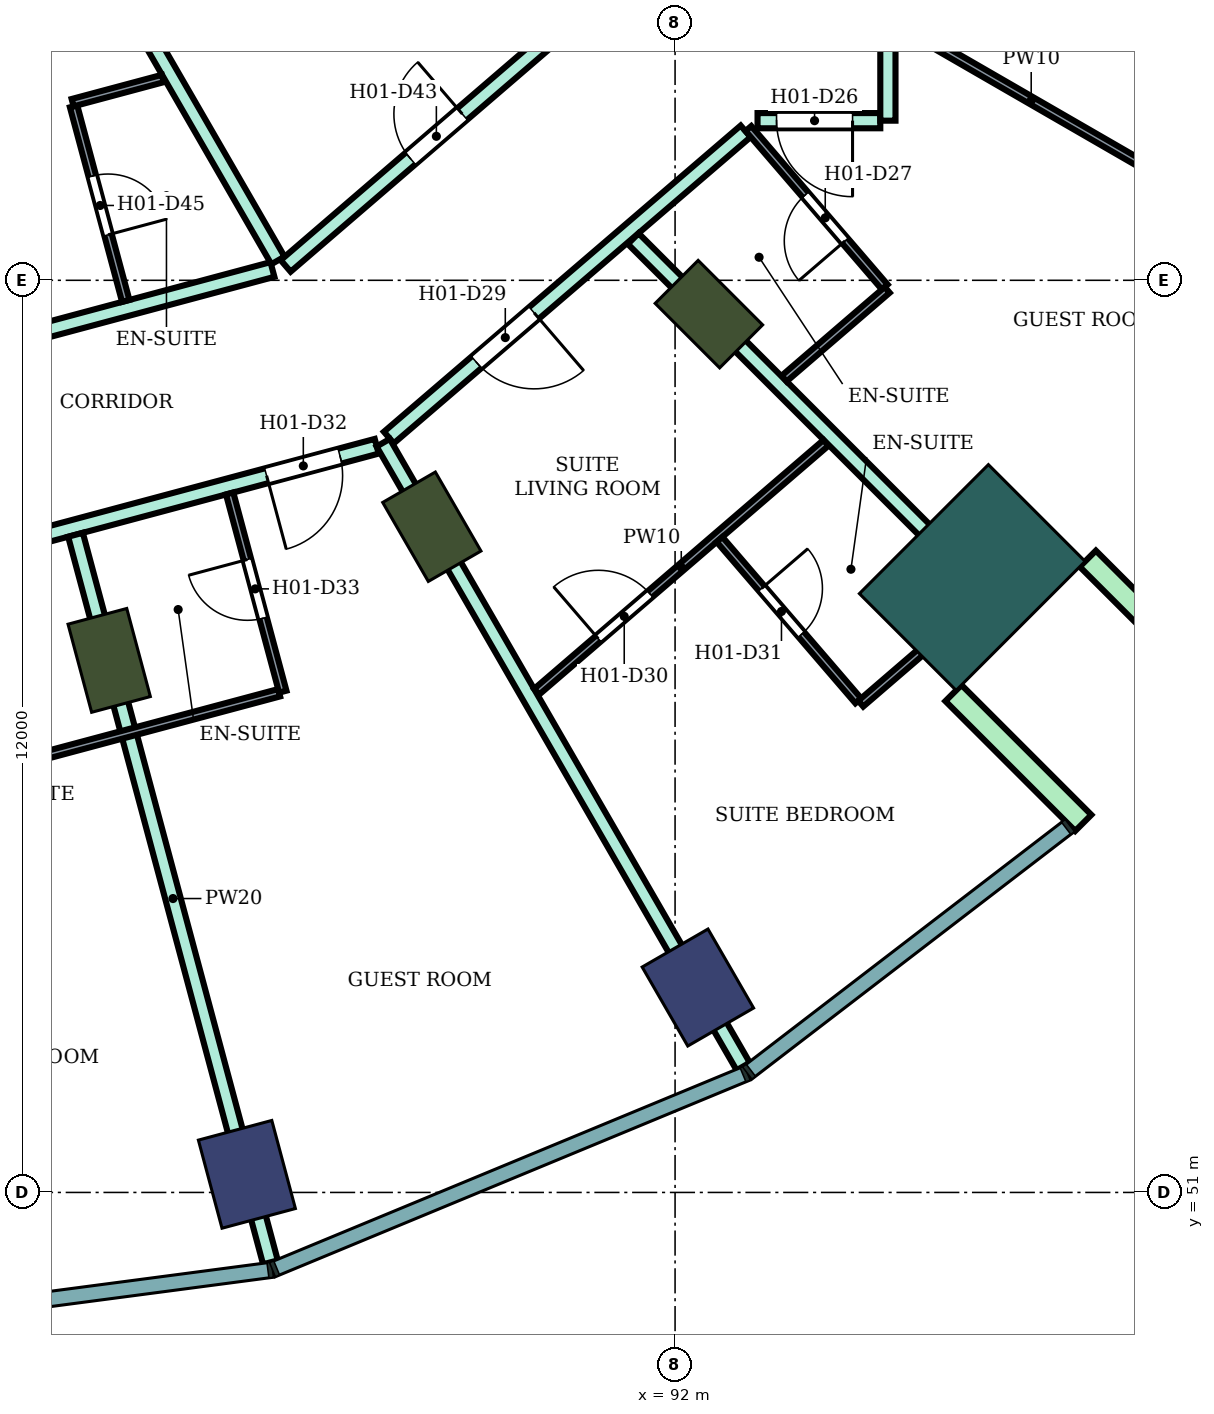
"""IFC4 building model, lengths in metres.
Left out: names, types, materials, properties, quantities, classifications, styles, units other than length and angle.
Written with IfcOpenShell. Run it as: python <this file> out.ifc"""

import sys

from ifc_helpers import new_model, si_unit, direction, frame, frame_2d, origin, origin_2d, place, context, subcontext, project, spatial, rectangle, extrude, element, fill, save


model = new_model("IFC4")
c1 = context("Model", 3, precision=1e-05, world=origin(), true_north=direction((0.0, 1.0)))
c2 = subcontext(c1, "Body", "Model", "MODEL_VIEW")
j1 = project(units=[si_unit("LENGTHUNIT", "METRE"), si_unit("PLANEANGLEUNIT", "RADIAN")], contexts=[c1])
p1 = place(None, origin())
s1 = spatial("IfcSite", under=j1, at=p1, CompositionType="ELEMENT")
p2 = place(p1, origin())
s2 = spatial("IfcBuilding", under=s1, at=p2, CompositionType="ELEMENT")
p3 = place(p2, frame((0.0, 0.0, 32.6)))
s3 = spatial("IfcBuildingStorey", under=s2, at=p3, CompositionType="ELEMENT", Elevation=32.6)
for number, where, z_axis, x_axis in (
    (1, (86.367, 51.238, 0.0), (0.0, 0.0, 1.0), (0.259, -0.966, 0.0)),
    (2, (92.3, 53.696, 0.0), (0.0, 0.0, 1.0), (0.5, -0.866, 0.0)),
):
    element("IfcColumn", number, at=place(p3, frame(where, z_axis=z_axis, x_axis=x_axis)), inside=s3, PredefinedType="COLUMN", context=c2, shape_type="SweptSolid", body=[
        extrude(rectangle(XDim=1.2, YDim=1.0, at=origin_2d()), origin(), (0.0, 0.0, 1.0), 3.8),
    ])
for number, where, z_axis, x_axis in (
    (3, (84.555, 58.0, 0.0), (0.0, 0.0, 1.0), (0.259, -0.966, 0.0)),
    (4, (88.8, 59.758, 0.0), (0.0, 0.0, 1.0), (0.5, -0.866, 0.0)),
    (5, (92.445, 62.555, 0.0), (0.0, 0.0, 1.0), (0.707, -0.707, 0.0)),
):
    element("IfcColumn", number, at=place(p3, frame(where, z_axis=z_axis, x_axis=x_axis)), inside=s3, PredefinedType="COLUMN", context=c2, shape_type="SweptSolid", body=[
        extrude(rectangle(XDim=1.2, YDim=0.8, at=origin_2d()), origin(), (0.0, 0.0, 1.0), 3.8),
    ])
p4 = place(p3, frame((95.91, 59.09, 0.0), z_axis=(0.0, 0.0, 1.0), x_axis=(0.707106781187, -0.707106781187, 0.0)))
e6 = element("IfcColumn", 6, at=p4, inside=s3, PredefinedType="COLUMN", context=c2, shape_type="SweptSolid", body=[
    extrude(rectangle(XDim=1.8, YDim=2.4, at=origin_2d()), origin(), (0.0, 0.0, 1.0), 3.8),
])
for number, where, z_axis, x_axis in (
    (7, (95.662, 57.57, 0.0), (0.0, 0.0, 1.0), (0.707, -0.707, 0.0)),
    (8, (97.43, 59.338, 0.0), (0.0, 0.0, 1.0), (0.707, -0.707, 0.0)),
):
    element("IfcWall", number, at=place(p3, frame(where, z_axis=z_axis, x_axis=x_axis)), inside=s3, PredefinedType="NOTDEFINED", context=c2, shape_type="SweptSolid", body=[
        extrude(rectangle(XDim=2.416, YDim=0.3, at=frame_2d((1.208, 0.0))), origin(), (0.0, 0.0, 1.0), 3.8),
    ])
p5 = place(p3, frame((80.0, 58.655, 0.0), z_axis=(0.0, 0.0, 1.0), x_axis=(0.965974635626, 0.258636817424, 0.0)))
e9 = element("IfcWall", 9, at=p5, inside=s3, PredefinedType="PARTITIONING", context=c2, shape_type="SweptSolid", body=[
    extrude(rectangle(XDim=8.36, YDim=0.2, at=frame_2d((4.18, 0.0))), origin(), (0.0, 0.0, 1.0), 3.35),
])
p6 = place(p5, frame((6.86, 0.0, 0.0)))
e10 = element("IfcOpeningElement", 10, at=p6, cuts=e9, PredefinedType="OPENING", context=c2, shape_type="SweptSolid", body=[
    extrude(rectangle(XDim=1.0, YDim=2.1, at=frame_2d((0.5, 1.05))), frame((0.0, 0.11, 0.0), z_axis=(0.0, -1.0, 0.0), x_axis=(1.0, 0.0, 0.0)), (0.0, 0.0, 1.0), 0.22),
])
p7 = place(p5, frame((0.55, 0.0, 0.0)))
e11 = element("IfcOpeningElement", 11, at=p7, cuts=e9, PredefinedType="OPENING", context=c2, shape_type="SweptSolid", body=[
    extrude(rectangle(XDim=1.0, YDim=2.1, at=frame_2d((0.5, 1.05))), frame((0.0, 0.11, 0.0), z_axis=(0.0, -1.0, 0.0), x_axis=(1.0, 0.0, 0.0)), (0.0, 0.0, 1.0), 0.22),
])
p8 = place(p3, frame((80.0, 61.346, 0.0), z_axis=(0.0, 0.0, 1.0), x_axis=(0.965924181808, 0.258825182312, 0.0)))
e12 = element("IfcWall", 12, at=p8, inside=s3, PredefinedType="PARTITIONING", context=c2, shape_type="SweptSolid", body=[
    extrude(rectangle(XDim=6.94, YDim=0.2, at=frame_2d((3.47, 0.0))), origin(), (0.0, 0.0, 1.0), 3.35),
])
p9 = place(p8, frame((0.55, 0.0, 0.0)))
e13 = element("IfcOpeningElement", 13, at=p9, cuts=e12, PredefinedType="OPENING", context=c2, shape_type="SweptSolid", body=[
    extrude(rectangle(XDim=1.0, YDim=2.1, at=frame_2d((0.5, 1.05))), frame((0.0, 0.11, 0.0), z_axis=(0.0, -1.0, 0.0), x_axis=(1.0, 0.0, 0.0)), (0.0, 0.0, 1.0), 0.22),
])
p10 = place(p3, frame((83.848, 68.333, 0.0), z_axis=(0.0, 0.0, 1.0), x_axis=(0.499951054106, -0.866053660865, 0.0)))
e14 = element("IfcWall", 14, at=p10, inside=s3, PredefinedType="PARTITIONING", context=c2, shape_type="SweptSolid", body=[
    extrude(rectangle(XDim=5.855, YDim=0.2, at=frame_2d((2.927, 0.0))), origin(), (0.0, 0.0, 1.0), 3.35),
])
p11 = place(p3, frame((84.112, 59.652, 0.0), z_axis=(0.0, 0.0, 1.0), x_axis=(0.258791091927, -0.965933315886, 0.0)))
e15 = element("IfcWall", 15, at=p11, inside=s3, PredefinedType="PARTITIONING", context=c2, shape_type="SweptSolid", body=[
    extrude(rectangle(XDim=9.909, YDim=0.2, at=frame_2d((4.955, 0.0))), origin(), (0.0, 0.0, 1.0), 3.35),
])
p12 = place(p3, frame((86.877, 63.189, 0.0), z_axis=(0.0, 0.0, 1.0), x_axis=(0.758075808328, 0.652166442581, 0.0)))
e16 = element("IfcWall", 16, at=p12, inside=s3, PredefinedType="PARTITIONING", context=c2, shape_type="SweptSolid", body=[
    extrude(rectangle(XDim=5.23, YDim=0.2, at=frame_2d((2.615, 0.0))), origin(), (0.0, 0.0, 1.0), 3.35),
])
p13 = place(p12, frame((2.165, 0.0, 0.0)))
e17 = element("IfcOpeningElement", 17, at=p13, cuts=e16, PredefinedType="OPENING", context=c2, shape_type="SweptSolid", body=[
    extrude(rectangle(XDim=0.9, YDim=2.1, at=frame_2d((0.45, 1.05))), frame((0.0, 0.11, 0.0), z_axis=(0.0, -1.0, 0.0), x_axis=(1.0, 0.0, 0.0)), (0.0, 0.0, 1.0), 0.22),
])
p14 = place(p3, frame((88.235, 60.931, 0.0), z_axis=(0.0, 0.0, 1.0), x_axis=(0.758799498714, 0.651324282329, 0.0)))
e18 = element("IfcWall", 18, at=p14, inside=s3, PredefinedType="PARTITIONING", context=c2, shape_type="SweptSolid", body=[
    extrude(rectangle(XDim=6.186, YDim=0.2, at=frame_2d((3.093, 0.0))), origin(), (0.0, 0.0, 1.0), 3.35),
])
p15 = place(p14, frame((1.519, 0.0, 0.0)))
e19 = element("IfcOpeningElement", 19, at=p15, cuts=e18, PredefinedType="OPENING", context=c2, shape_type="SweptSolid", body=[
    extrude(rectangle(XDim=1.0, YDim=2.1, at=frame_2d((0.5, 1.05))), frame((0.0, 0.11, 0.0), z_axis=(0.0, -1.0, 0.0), x_axis=(1.0, 0.0, 0.0)), (0.0, 0.0, 1.0), 0.22),
])
p16 = place(p3, frame((88.16, 60.863, 0.0), z_axis=(0.0, 0.0, 1.0), x_axis=(0.499946996988, -0.866056002925, 0.0)))
e20 = element("IfcWall", 20, at=p16, inside=s3, PredefinedType="PARTITIONING", context=c2, shape_type="SweptSolid", body=[
    extrude(rectangle(XDim=9.475, YDim=0.2, at=frame_2d((4.737, 0.0))), origin(), (0.0, 0.0, 1.0), 3.35),
])
p17 = place(p3, frame((91.449, 63.548, 0.0), z_axis=(0.0, 0.0, 1.0), x_axis=(0.706984804638, -0.707228736698, 0.0)))
e21 = element("IfcWall", 21, at=p17, inside=s3, PredefinedType="PARTITIONING", context=c2, shape_type="SweptSolid", body=[
    extrude(rectangle(XDim=7.006, YDim=0.2, at=frame_2d((3.503, 0.0))), origin(), (0.0, 0.0, 1.0), 3.35),
])
p18 = place(p3, frame((93.085, 65.1, 0.0), z_axis=(0.0, 0.0, 1.0), x_axis=(1.0, 0.0, 0.0)))
e22 = element("IfcWall", 22, at=p18, inside=s3, PredefinedType="PARTITIONING", context=c2, shape_type="SweptSolid", body=[
    extrude(rectangle(XDim=1.615, YDim=0.2, at=frame_2d((0.808, 0.0))), origin(), (0.0, 0.0, 1.0), 3.35),
])
p19 = place(p18, frame((0.25, 0.0, 0.0)))
e23 = element("IfcOpeningElement", 23, at=p19, cuts=e22, PredefinedType="OPENING", context=c2, shape_type="SweptSolid", body=[
    extrude(rectangle(XDim=1.0, YDim=2.1, at=frame_2d((0.5, 1.05))), frame((0.0, 0.11, 0.0), z_axis=(0.0, -1.0, 0.0), x_axis=(1.0, 0.0, 0.0)), (0.0, 0.0, 1.0), 0.22),
])
p20 = place(p3, frame((94.8, 65.1, 0.0), z_axis=(0.0, 0.0, 1.0), x_axis=(0.0, 1.0, 0.0)))
e24 = element("IfcWall", 24, at=p20, inside=s3, PredefinedType="PARTITIONING", context=c2, shape_type="SweptSolid", body=[
    extrude(rectangle(XDim=1.25, YDim=0.2, at=frame_2d((0.625, 0.0))), origin(), (0.0, 0.0, 1.0), 3.35),
])
p21 = place(p3, frame((82.782, 56.501, 0.0), z_axis=(0.0, 0.0, 1.0), x_axis=(0.965999228418, 0.258544949083, 0.0)))
e25 = element("IfcWall", 25, at=p21, inside=s3, PredefinedType="PARTITIONING", context=c2, shape_type="SweptSolid", body=[
    extrude(rectangle(XDim=4.15, YDim=0.1, at=frame_2d((2.075, 0.0))), origin(), (0.0, 0.0, 1.0), 3.35),
])
p22 = place(p3, frame((84.087, 65.289, 0.0), z_axis=(0.0, 0.0, 1.0), x_axis=(0.258929459649, -0.965896234037, 0.0)))
e26 = element("IfcWall", 26, at=p22, inside=s3, PredefinedType="PARTITIONING", context=c2, shape_type="SweptSolid", body=[
    extrude(rectangle(XDim=2.65, YDim=0.1, at=frame_2d((1.325, 0.0))), origin(), (0.0, 0.0, 1.0), 3.35),
])
p23 = place(p22, frame((0.95, 0.0, 0.0)))
e27 = element("IfcOpeningElement", 27, at=p23, cuts=e26, PredefinedType="OPENING", context=c2, shape_type="SweptSolid", body=[
    extrude(rectangle(XDim=0.8, YDim=2.1, at=frame_2d((0.4, 1.05))), frame((0.0, 0.06, 0.0), z_axis=(0.0, -1.0, 0.0), x_axis=(1.0, 0.0, 0.0)), (0.0, 0.0, 1.0), 0.12),
])
p24 = place(p3, frame((84.074, 65.337, 0.0), z_axis=(0.0, 0.0, 1.0), x_axis=(0.965914351064, 0.258861867428, 0.0)))
e28 = element("IfcWall", 28, at=p24, inside=s3, PredefinedType="PARTITIONING", context=c2, shape_type="SweptSolid", body=[
    extrude(rectangle(XDim=1.229, YDim=0.1, at=frame_2d((0.615, 0.0))), origin(), (0.0, 0.0, 1.0), 3.35),
])
p25 = place(p3, frame((86.14, 60.196, 0.0), z_axis=(0.0, 0.0, 1.0), x_axis=(0.258945475746, -0.965891940432, 0.0)))
e29 = element("IfcWall", 29, at=p25, inside=s3, PredefinedType="PARTITIONING", context=c2, shape_type="SweptSolid", body=[
    extrude(rectangle(XDim=2.7, YDim=0.1, at=frame_2d((1.35, 0.0))), origin(), (0.0, 0.0, 1.0), 3.35),
])
p26 = place(p25, frame((0.9, 0.0, 0.0)))
e30 = element("IfcOpeningElement", 30, at=p26, cuts=e29, PredefinedType="OPENING", context=c2, shape_type="SweptSolid", body=[
    extrude(rectangle(XDim=0.8, YDim=2.1, at=frame_2d((0.4, 1.05))), frame((0.0, 0.06, 0.0), z_axis=(0.0, -1.0, 0.0), x_axis=(1.0, 0.0, 0.0)), (0.0, 0.0, 1.0), 0.12),
])
p27 = place(p3, frame((90.178, 57.587, 0.0), z_axis=(0.0, 0.0, 1.0), x_axis=(0.758140003227, 0.652091815243, 0.0)))
e31 = element("IfcWall", 31, at=p27, inside=s3, PredefinedType="PARTITIONING", context=c2, shape_type="SweptSolid", body=[
    extrude(rectangle(XDim=5.021, YDim=0.1, at=frame_2d((2.51, 0.0))), origin(), (0.0, 0.0, 1.0), 3.35),
])
p28 = place(p27, frame((1.071, 0.0, 0.0)))
e32 = element("IfcOpeningElement", 32, at=p28, cuts=e31, PredefinedType="OPENING", context=c2, shape_type="SweptSolid", body=[
    extrude(rectangle(XDim=0.9, YDim=2.1, at=frame_2d((0.45, 1.05))), frame((0.0, 0.06, 0.0), z_axis=(0.0, -1.0, 0.0), x_axis=(1.0, 0.0, 0.0)), (0.0, 0.0, 1.0), 0.12),
])
p29 = place(p3, frame((92.585, 59.591, 0.0), z_axis=(0.0, 0.0, 1.0), x_axis=(0.652011200591, -0.758209334092, 0.0)))
e33 = element("IfcWall", 33, at=p29, inside=s3, PredefinedType="PARTITIONING", context=c2, shape_type="SweptSolid", body=[
    extrude(rectangle(XDim=2.8, YDim=0.1, at=frame_2d((1.4, 0.0))), origin(), (0.0, 0.0, 1.0), 3.35),
])
p30 = place(p29, frame((0.85, 0.0, 0.0)))
e34 = element("IfcOpeningElement", 34, at=p30, cuts=e33, PredefinedType="OPENING", context=c2, shape_type="SweptSolid", body=[
    extrude(rectangle(XDim=0.8, YDim=2.1, at=frame_2d((0.4, 1.05))), frame((0.0, 0.06, 0.0), z_axis=(0.0, -1.0, 0.0), x_axis=(1.0, 0.0, 0.0)), (0.0, 0.0, 1.0), 0.12),
])
p31 = place(p3, frame((92.965, 64.997, 0.0), z_axis=(0.0, 0.0, 1.0), x_axis=(0.652069888227, -0.758158862553, 0.0)))
e35 = element("IfcWall", 35, at=p31, inside=s3, PredefinedType="PARTITIONING", context=c2, shape_type="SweptSolid", body=[
    extrude(rectangle(XDim=2.75, YDim=0.1, at=frame_2d((1.375, 0.0))), origin(), (0.0, 0.0, 1.0), 3.35),
])
p32 = place(p31, frame((1.15, 0.0, 0.0)))
e36 = element("IfcOpeningElement", 36, at=p32, cuts=e35, PredefinedType="OPENING", context=c2, shape_type="SweptSolid", body=[
    extrude(rectangle(XDim=0.8, YDim=2.1, at=frame_2d((0.4, 1.05))), frame((0.0, 0.06, 0.0), z_axis=(0.0, -1.0, 0.0), x_axis=(1.0, 0.0, 0.0)), (0.0, 0.0, 1.0), 0.12),
])
p33 = place(p3, frame((93.435, 61.707, 0.0), z_axis=(0.0, 0.0, 1.0), x_axis=(0.758070495124, 0.652172618578, 0.0)))
e37 = element("IfcWall", 37, at=p33, inside=s3, PredefinedType="PARTITIONING", context=c2, shape_type="SweptSolid", body=[
    extrude(rectangle(XDim=1.789, YDim=0.1, at=frame_2d((0.895, 0.0))), origin(), (0.0, 0.0, 1.0), 3.35),
])
p34 = place(p3, frame((94.443, 57.43, 0.0), z_axis=(0.0, 0.0, 1.0), x_axis=(0.757840386328, 0.65243999636, 0.0)))
e38 = element("IfcWall", 38, at=p34, inside=s3, PredefinedType="PARTITIONING", context=c2, shape_type="SweptSolid", body=[
    extrude(rectangle(XDim=2.108, YDim=0.1, at=frame_2d((1.054, 0.0))), origin(), (0.0, 0.0, 1.0), 3.35),
])
p35 = place(p3, frame((94.8, 66.455, 0.0), z_axis=(0.0, 0.0, 1.0), x_axis=(0.86602264145, -0.500004784474, 0.0)))
e39 = element("IfcWall", 39, at=p35, inside=s3, PredefinedType="PARTITIONING", context=c2, shape_type="SweptSolid", body=[
    extrude(rectangle(XDim=8.708, YDim=0.1, at=frame_2d((4.354, 0.0))), origin(), (0.0, 0.0, 1.0), 3.35),
])
p36 = place(p35, frame((3.879, 0.0, 0.0)))
e40 = element("IfcOpeningElement", 40, at=p36, cuts=e39, PredefinedType="OPENING", context=c2, shape_type="SweptSolid", body=[
    extrude(rectangle(XDim=0.9, YDim=2.1, at=frame_2d((0.45, 1.05))), frame((0.0, 0.06, 0.0), z_axis=(0.0, -1.0, 0.0), x_axis=(1.0, 0.0, 0.0)), (0.0, 0.0, 1.0), 0.12),
])
p37 = place(p19, frame((1.0, 0.0, 0.0), z_axis=(0.0, 0.0, 1.0), x_axis=(-1.0, 0.0, 0.0)))
e41 = element("IfcDoor", 41, at=p37, inside=s3, OperationType="SINGLE_SWING_LEFT", PredefinedType="DOOR", context=c2, shape_type="SweptSolid", body=[
    extrude(rectangle(XDim=1.0, YDim=2.1, at=frame_2d((0.5, 1.05))), frame((0.0, 0.025, 0.0), z_axis=(0.0, -1.0, 0.0), x_axis=(1.0, 0.0, 0.0)), (0.0, 0.0, 1.0), 0.05),
])
fill(e23, e41)
p38 = place(p32, frame((0.8, 0.0, 0.0), z_axis=(0.0, 0.0, 1.0), x_axis=(-1.0, 0.0, 0.0)))
e42 = element("IfcDoor", 42, at=p38, inside=s3, OperationType="SINGLE_SWING_LEFT", PredefinedType="DOOR", context=c2, shape_type="SweptSolid", body=[
    extrude(rectangle(XDim=0.8, YDim=2.1, at=frame_2d((0.4, 1.05))), frame((0.0, 0.025, 0.0), z_axis=(0.0, -1.0, 0.0), x_axis=(1.0, 0.0, 0.0)), (0.0, 0.0, 1.0), 0.05),
])
fill(e36, e42)
p39 = place(p15, frame((1.0, 0.0, 0.0), z_axis=(0.0, 0.0, 1.0), x_axis=(-1.0, 0.0, 0.0)))
e43 = element("IfcDoor", 43, at=p39, inside=s3, OperationType="SINGLE_SWING_LEFT", PredefinedType="DOOR", context=c2, shape_type="SweptSolid", body=[
    extrude(rectangle(XDim=1.0, YDim=2.1, at=frame_2d((0.5, 1.05))), frame((0.0, 0.025, 0.0), z_axis=(0.0, -1.0, 0.0), x_axis=(1.0, 0.0, 0.0)), (0.0, 0.0, 1.0), 0.05),
])
fill(e19, e43)
p40 = place(p28, origin())
e44 = element("IfcDoor", 44, at=p40, inside=s3, OperationType="SINGLE_SWING_LEFT", PredefinedType="DOOR", context=c2, shape_type="SweptSolid", body=[
    extrude(rectangle(XDim=0.9, YDim=2.1, at=frame_2d((0.45, 1.05))), frame((0.0, 0.025, 0.0), z_axis=(0.0, -1.0, 0.0), x_axis=(1.0, 0.0, 0.0)), (0.0, 0.0, 1.0), 0.05),
])
fill(e32, e44)
p41 = place(p30, origin())
e45 = element("IfcDoor", 45, at=p41, inside=s3, OperationType="SINGLE_SWING_LEFT", PredefinedType="DOOR", context=c2, shape_type="SweptSolid", body=[
    extrude(rectangle(XDim=0.8, YDim=2.1, at=frame_2d((0.4, 1.05))), frame((0.0, 0.025, 0.0), z_axis=(0.0, -1.0, 0.0), x_axis=(1.0, 0.0, 0.0)), (0.0, 0.0, 1.0), 0.05),
])
fill(e34, e45)
p42 = place(p6, frame((1.0, 0.0, 0.0), z_axis=(0.0, 0.0, 1.0), x_axis=(-1.0, 0.0, 0.0)))
e46 = element("IfcDoor", 46, at=p42, inside=s3, OperationType="SINGLE_SWING_RIGHT", PredefinedType="DOOR", context=c2, shape_type="SweptSolid", body=[
    extrude(rectangle(XDim=1.0, YDim=2.1, at=frame_2d((0.5, 1.05))), frame((0.0, 0.025, 0.0), z_axis=(0.0, -1.0, 0.0), x_axis=(1.0, 0.0, 0.0)), (0.0, 0.0, 1.0), 0.05),
])
fill(e10, e46)
p43 = place(p26, frame((0.8, 0.0, 0.0), z_axis=(0.0, 0.0, 1.0), x_axis=(-1.0, 0.0, 0.0)))
e47 = element("IfcDoor", 47, at=p43, inside=s3, OperationType="SINGLE_SWING_RIGHT", PredefinedType="DOOR", context=c2, shape_type="SweptSolid", body=[
    extrude(rectangle(XDim=0.8, YDim=2.1, at=frame_2d((0.4, 1.05))), frame((0.0, 0.025, 0.0), z_axis=(0.0, -1.0, 0.0), x_axis=(1.0, 0.0, 0.0)), (0.0, 0.0, 1.0), 0.05),
])
fill(e30, e47)
p44 = place(p13, origin())
e48 = element("IfcDoor", 48, at=p44, inside=s3, OperationType="SINGLE_SWING_RIGHT", PredefinedType="DOOR", context=c2, shape_type="SweptSolid", body=[
    extrude(rectangle(XDim=0.9, YDim=2.1, at=frame_2d((0.45, 1.05))), frame((0.0, 0.025, 0.0), z_axis=(0.0, -1.0, 0.0), x_axis=(1.0, 0.0, 0.0)), (0.0, 0.0, 1.0), 0.05),
])
fill(e17, e48)
p45 = place(p23, origin())
e49 = element("IfcDoor", 49, at=p45, inside=s3, OperationType="SINGLE_SWING_RIGHT", PredefinedType="DOOR", context=c2, shape_type="SweptSolid", body=[
    extrude(rectangle(XDim=0.8, YDim=2.1, at=frame_2d((0.4, 1.05))), frame((0.0, 0.025, 0.0), z_axis=(0.0, -1.0, 0.0), x_axis=(1.0, 0.0, 0.0)), (0.0, 0.0, 1.0), 0.05),
])
fill(e27, e49)
save(model, sys.argv[1])
